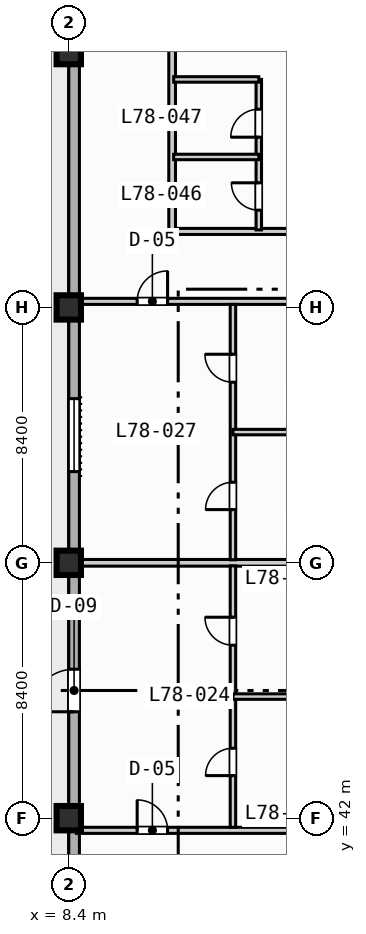
"""IFC4 building model, lengths in metres.
Left out: names, types, materials, properties, quantities, classifications, styles, units other than length and angle.
Written with IfcOpenShell. Run it as: python <this file> out.ifc"""

import sys

from ifc_helpers import new_model, si_unit, direction, frame, frame_2d, origin, origin_2d, place, context, subcontext, project, spatial, rectangle, extrude, element, fill, save


model = new_model("IFC4")
c1 = context("Model", 3, precision=1e-05, world=origin(), true_north=direction((0.0, 1.0)))
c2 = subcontext(c1, "Body", "Model", "MODEL_VIEW")
j1 = project(units=[si_unit("LENGTHUNIT", "METRE"), si_unit("PLANEANGLEUNIT", "RADIAN")], contexts=[c1])
p1 = place(None, origin())
s1 = spatial("IfcSite", under=j1, at=p1, CompositionType="ELEMENT")
p2 = place(p1, origin())
s2 = spatial("IfcBuilding", under=s1, at=p2, CompositionType="ELEMENT")
p3 = place(p2, frame((0.0, 0.0, 316.4)))
s3 = spatial("IfcBuildingStorey", under=s2, at=p3, CompositionType="ELEMENT", Elevation=316.4)
for number, where, z_axis, x_axis in (
    (1, (8.4, 42.0, 0.0), (0.0, 0.0, 1.0), (1.0, 0.0, 0.0)),
    (2, (8.4, 50.4, 0.0), (0.0, 0.0, 1.0), (1.0, 0.0, 0.0)),
    (3, (8.4, 58.8, 0.0), (0.0, 0.0, 1.0), (1.0, 0.0, 0.0)),
    (4, (8.4, 67.2, 0.0), (0.0, 0.0, 1.0), (1.0, 0.0, 0.0)),
):
    element("IfcColumn", number, at=place(p3, frame(where, z_axis=z_axis, x_axis=x_axis)), inside=s3, PredefinedType="COLUMN", context=c2, shape_type="SweptSolid", body=[
        extrude(rectangle(XDim=0.8, YDim=0.8, at=origin_2d()), origin(), (0.0, 0.0, 1.0), 3.9),
    ])
p4 = place(p3, frame((8.575, 11.575, 0.0), z_axis=(0.0, 0.0, 1.0), x_axis=(0.0, 1.0, 0.0)))
e5 = element("IfcWall", 5, at=p4, inside=s3, PredefinedType="STANDARD", context=c2, shape_type="SweptSolid", body=[
    extrude(rectangle(XDim=60.85, YDim=0.35, at=frame_2d((30.425, 0.0))), origin(), (0.0, 0.0, 1.0), 3.67),
])
p5 = place(p4, frame((33.925, 0.0, 0.0)))
e6 = element("IfcOpeningElement", 6, at=p5, cuts=e5, PredefinedType="OPENING", context=c2, shape_type="SweptSolid", body=[
    extrude(rectangle(XDim=1.4, YDim=2.2, at=frame_2d((0.7, 1.1))), frame((0.0, 0.185, 0.0), z_axis=(0.0, -1.0, 0.0), x_axis=(1.0, 0.0, 0.0)), (0.0, 0.0, 1.0), 0.37),
])
p6 = place(p4, frame((25.025, 0.0, 0.85)))
e7 = element("IfcOpeningElement", 7, at=p6, cuts=e5, PredefinedType="OPENING", context=c2, shape_type="SweptSolid", body=[
    extrude(rectangle(XDim=2.4, YDim=1.95, at=frame_2d((1.2, 0.975))), frame((0.0, 0.185, 0.0), z_axis=(0.0, -1.0, 0.0), x_axis=(1.0, 0.0, 0.0)), (0.0, 0.0, 1.0), 0.37),
])
p7 = place(p4, frame((41.825, 0.0, 0.85)))
e8 = element("IfcOpeningElement", 8, at=p7, cuts=e5, PredefinedType="OPENING", context=c2, shape_type="SweptSolid", body=[
    extrude(rectangle(XDim=2.4, YDim=1.95, at=frame_2d((1.2, 0.975))), frame((0.0, 0.185, 0.0), z_axis=(0.0, -1.0, 0.0), x_axis=(1.0, 0.0, 0.0)), (0.0, 0.0, 1.0), 0.37),
])
p8 = place(p4, frame((19.25, 0.0, 0.85)))
e9 = element("IfcOpeningElement", 9, at=p8, cuts=e5, PredefinedType="OPENING", context=c2, shape_type="SweptSolid", body=[
    extrude(rectangle(XDim=1.8, YDim=1.8, at=frame_2d((0.9, 0.9))), frame((0.0, 0.185, 0.0), z_axis=(0.0, -1.0, 0.0), x_axis=(1.0, 0.0, 0.0)), (0.0, 0.0, 1.0), 0.37),
])
p9 = place(p3, frame((8.65, 41.6, 0.0), z_axis=(0.0, 0.0, 1.0), x_axis=(1.0, 0.0, 0.0)))
e10 = element("IfcWall", 10, at=p9, inside=s3, PredefinedType="PARTITIONING", context=c2, shape_type="SweptSolid", body=[
    extrude(rectangle(XDim=7.95, YDim=0.2, at=frame_2d((3.975, 0.0))), origin(), (0.0, 0.0, 1.0), 3.67),
])
p10 = place(p9, frame((2.0, 0.0, 0.0)))
e11 = element("IfcOpeningElement", 11, at=p10, cuts=e10, PredefinedType="OPENING", context=c2, shape_type="SweptSolid", body=[
    extrude(rectangle(XDim=1.0, YDim=2.15, at=frame_2d((0.5, 1.075))), frame((0.0, 0.11, 0.0), z_axis=(0.0, -1.0, 0.0), x_axis=(1.0, 0.0, 0.0)), (0.0, 0.0, 1.0), 0.22),
])
p11 = place(p3, frame((8.65, 59.0, 0.0), z_axis=(0.0, 0.0, 1.0), x_axis=(1.0, 0.0, 0.0)))
e12 = element("IfcWall", 12, at=p11, inside=s3, PredefinedType="PARTITIONING", context=c2, shape_type="SweptSolid", body=[
    extrude(rectangle(XDim=7.95, YDim=0.2, at=frame_2d((3.975, 0.0))), origin(), (0.0, 0.0, 1.0), 3.07),
])
p12 = place(p11, frame((2.0, 0.0, 0.0)))
e13 = element("IfcOpeningElement", 13, at=p12, cuts=e12, PredefinedType="OPENING", context=c2, shape_type="SweptSolid", body=[
    extrude(rectangle(XDim=1.0, YDim=2.15, at=frame_2d((0.5, 1.075))), frame((0.0, 0.11, 0.0), z_axis=(0.0, -1.0, 0.0), x_axis=(1.0, 0.0, 0.0)), (0.0, 0.0, 1.0), 0.22),
])
p13 = place(p3, frame((8.65, 50.4, 0.0), z_axis=(0.0, 0.0, 1.0), x_axis=(1.0, 0.0, 0.0)))
e14 = element("IfcWall", 14, at=p13, inside=s3, PredefinedType="PARTITIONING", context=c2, shape_type="SweptSolid", body=[
    extrude(rectangle(XDim=7.95, YDim=0.22, at=frame_2d((3.975, 0.0))), origin(), (0.0, 0.0, 1.0), 3.207),
])
p14 = place(p3, frame((13.8, 41.7, 0.0), z_axis=(0.0, 0.0, 1.0), x_axis=(0.0, 1.0, 0.0)))
e15 = element("IfcWall", 15, at=p14, inside=s3, PredefinedType="PLUMBINGWALL", context=c2, shape_type="SweptSolid", body=[
    extrude(rectangle(XDim=8.6, YDim=0.18, at=frame_2d((4.3, 0.0))), origin(), (0.0, 0.0, 1.0), 3.67),
])
p15 = place(p14, frame((1.7, 0.0, 0.0)))
e16 = element("IfcOpeningElement", 16, at=p15, cuts=e15, PredefinedType="OPENING", context=c2, shape_type="SweptSolid", body=[
    extrude(rectangle(XDim=0.9, YDim=2.1, at=frame_2d((0.45, 1.05))), frame((0.0, 0.1, 0.0), z_axis=(0.0, -1.0, 0.0), x_axis=(1.0, 0.0, 0.0)), (0.0, 0.0, 1.0), 0.2),
])
p16 = place(p14, frame((5.99, 0.0, 0.0)))
e17 = element("IfcOpeningElement", 17, at=p16, cuts=e15, PredefinedType="OPENING", context=c2, shape_type="SweptSolid", body=[
    extrude(rectangle(XDim=0.92, YDim=2.1, at=frame_2d((0.46, 1.05))), frame((0.0, 0.1, 0.0), z_axis=(0.0, -1.0, 0.0), x_axis=(1.0, 0.0, 0.0)), (0.0, 0.0, 1.0), 0.2),
])
p17 = place(p3, frame((13.8, 46.0, 0.0), z_axis=(0.0, 0.0, 1.0), x_axis=(1.0, 0.0, 0.0)))
e18 = element("IfcWall", 18, at=p17, inside=s3, PredefinedType="PLUMBINGWALL", context=c2, shape_type="SweptSolid", body=[
    extrude(rectangle(XDim=2.8, YDim=0.18, at=frame_2d((1.4, 0.0))), origin(), (0.0, 0.0, 1.0), 3.67),
])
p18 = place(p3, frame((13.8, 50.5, 0.0), z_axis=(0.0, 0.0, 1.0), x_axis=(0.0, 1.0, 0.0)))
e19 = element("IfcWall", 19, at=p18, inside=s3, PredefinedType="PLUMBINGWALL", context=c2, shape_type="SweptSolid", body=[
    extrude(rectangle(XDim=8.4, YDim=0.18, at=frame_2d((4.2, 0.0))), origin(), (0.0, 0.0, 1.0), 3.67),
])
p19 = place(p18, frame((1.65, 0.0, 0.0)))
e20 = element("IfcOpeningElement", 20, at=p19, cuts=e19, PredefinedType="OPENING", context=c2, shape_type="SweptSolid", body=[
    extrude(rectangle(XDim=0.9, YDim=2.1, at=frame_2d((0.45, 1.05))), frame((0.0, 0.1, 0.0), z_axis=(0.0, -1.0, 0.0), x_axis=(1.0, 0.0, 0.0)), (0.0, 0.0, 1.0), 0.2),
])
p20 = place(p18, frame((5.84, 0.0, 0.0)))
e21 = element("IfcOpeningElement", 21, at=p20, cuts=e19, PredefinedType="OPENING", context=c2, shape_type="SweptSolid", body=[
    extrude(rectangle(XDim=0.92, YDim=2.1, at=frame_2d((0.46, 1.05))), frame((0.0, 0.1, 0.0), z_axis=(0.0, -1.0, 0.0), x_axis=(1.0, 0.0, 0.0)), (0.0, 0.0, 1.0), 0.2),
])
p21 = place(p3, frame((13.8, 54.7, 0.0), z_axis=(0.0, 0.0, 1.0), x_axis=(1.0, 0.0, 0.0)))
e22 = element("IfcWall", 22, at=p21, inside=s3, PredefinedType="PLUMBINGWALL", context=c2, shape_type="SweptSolid", body=[
    extrude(rectangle(XDim=2.8, YDim=0.18, at=frame_2d((1.4, 0.0))), origin(), (0.0, 0.0, 1.0), 3.67),
])
p22 = place(p3, frame((11.8, 61.3, 0.0), z_axis=(0.0, 0.0, 1.0), x_axis=(1.0, 0.0, 0.0)))
e23 = element("IfcWall", 23, at=p22, inside=s3, PredefinedType="PARTITIONING", context=c2, shape_type="SweptSolid", body=[
    extrude(rectangle(XDim=21.35, YDim=0.2, at=frame_2d((10.675, 0.0))), origin(), (0.0, 0.0, 1.0), 3.67),
])
p23 = place(p22, frame((4.05, 0.0, 0.0)))
e24 = element("IfcOpeningElement", 24, at=p23, cuts=e23, PredefinedType="OPENING", context=c2, shape_type="SweptSolid", body=[
    extrude(rectangle(XDim=1.0, YDim=2.15, at=frame_2d((0.5, 1.075))), frame((0.0, 0.11, 0.0), z_axis=(0.0, -1.0, 0.0), x_axis=(1.0, 0.0, 0.0)), (0.0, 0.0, 1.0), 0.22),
])
p24 = place(p3, frame((11.8, 61.3, 0.0), z_axis=(0.0, 0.0, 1.0), x_axis=(0.0, 1.0, 0.0)))
e25 = element("IfcWall", 25, at=p24, inside=s3, PredefinedType="PARTITIONING", context=c2, shape_type="SweptSolid", body=[
    extrude(rectangle(XDim=11.1, YDim=0.22, at=frame_2d((5.55, 0.0))), origin(), (0.0, 0.0, 1.0), 3.67),
])
p25 = place(p3, frame((14.65, 61.35, 0.0), z_axis=(0.0, 0.0, 1.0), x_axis=(0.0, 1.0, 0.0)))
e26 = element("IfcWall", 26, at=p25, inside=s3, PredefinedType="PLUMBINGWALL", context=c2, shape_type="SweptSolid", body=[
    extrude(rectangle(XDim=4.95, YDim=0.18, at=frame_2d((2.475, 0.0))), origin(), (0.0, 0.0, 1.0), 3.67),
])
p26 = place(p25, frame((0.65, 0.0, 0.0)))
e27 = element("IfcOpeningElement", 27, at=p26, cuts=e26, PredefinedType="OPENING", context=c2, shape_type="SweptSolid", body=[
    extrude(rectangle(XDim=0.9, YDim=2.1, at=frame_2d((0.45, 1.05))), frame((0.0, 0.1, 0.0), z_axis=(0.0, -1.0, 0.0), x_axis=(1.0, 0.0, 0.0)), (0.0, 0.0, 1.0), 0.2),
])
p27 = place(p25, frame((3.05, 0.0, 0.0)))
e28 = element("IfcOpeningElement", 28, at=p27, cuts=e26, PredefinedType="OPENING", context=c2, shape_type="SweptSolid", body=[
    extrude(rectangle(XDim=0.92, YDim=2.1, at=frame_2d((0.46, 1.05))), frame((0.0, 0.1, 0.0), z_axis=(0.0, -1.0, 0.0), x_axis=(1.0, 0.0, 0.0)), (0.0, 0.0, 1.0), 0.2),
])
for number, where, z_axis, x_axis in (
    (29, (11.85, 63.75, 0.0), (0.0, 0.0, 1.0), (1.0, 0.0, 0.0)),
    (30, (11.85, 66.3, 0.0), (0.0, 0.0, 1.0), (1.0, 0.0, 0.0)),
):
    element("IfcWall", number, at=place(p3, frame(where, z_axis=z_axis, x_axis=x_axis)), inside=s3, PredefinedType="PLUMBINGWALL", context=c2, shape_type="SweptSolid", body=[
        extrude(rectangle(XDim=2.8, YDim=0.18, at=frame_2d((1.4, 0.0))), origin(), (0.0, 0.0, 1.0), 3.67),
    ])
p28 = place(p5, origin())
e31 = element("IfcDoor", 31, at=p28, inside=s3, OperationType="SINGLE_SWING_LEFT", PredefinedType="DOOR", context=c2, shape_type="SweptSolid", body=[
    extrude(rectangle(XDim=1.4, YDim=2.2, at=frame_2d((0.7, 1.1))), frame((0.0, 0.025, 0.0), z_axis=(0.0, -1.0, 0.0), x_axis=(1.0, 0.0, 0.0)), (0.0, 0.0, 1.0), 0.05),
])
fill(e6, e31)
p29 = place(p7, origin())
e32 = element("IfcWindow", 32, at=p29, inside=s3, PartitioningType="SINGLE_PANEL", PredefinedType="WINDOW", context=c2, shape_type="SweptSolid", body=[
    extrude(rectangle(XDim=2.4, YDim=1.95, at=frame_2d((1.2, 0.975))), frame((0.0, 0.03, 0.0), z_axis=(0.0, -1.0, 0.0), x_axis=(1.0, 0.0, 0.0)), (0.0, 0.0, 1.0), 0.06),
])
fill(e8, e32)
p30 = place(p10, origin())
e33 = element("IfcDoor", 33, at=p30, inside=s3, OperationType="SINGLE_SWING_LEFT", PredefinedType="DOOR", context=c2, shape_type="SweptSolid", body=[
    extrude(rectangle(XDim=1.0, YDim=2.15, at=frame_2d((0.5, 1.075))), frame((0.0, 0.025, 0.0), z_axis=(0.0, -1.0, 0.0), x_axis=(1.0, 0.0, 0.0)), (0.0, 0.0, 1.0), 0.05),
])
fill(e11, e33)
p31 = place(p12, origin())
e34 = element("IfcDoor", 34, at=p31, inside=s3, OperationType="SINGLE_SWING_RIGHT", PredefinedType="DOOR", context=c2, shape_type="SweptSolid", body=[
    extrude(rectangle(XDim=1.0, YDim=2.15, at=frame_2d((0.5, 1.075))), frame((0.0, 0.025, 0.0), z_axis=(0.0, -1.0, 0.0), x_axis=(1.0, 0.0, 0.0)), (0.0, 0.0, 1.0), 0.05),
])
fill(e13, e34)
p32 = place(p15, origin())
e35 = element("IfcDoor", 35, at=p32, inside=s3, OperationType="SINGLE_SWING_LEFT", PredefinedType="DOOR", context=c2, shape_type="SweptSolid", body=[
    extrude(rectangle(XDim=0.9, YDim=2.1, at=frame_2d((0.45, 1.05))), frame((0.0, 0.025, 0.0), z_axis=(0.0, -1.0, 0.0), x_axis=(1.0, 0.0, 0.0)), (0.0, 0.0, 1.0), 0.05),
])
fill(e16, e35)
p33 = place(p16, origin())
e36 = element("IfcDoor", 36, at=p33, inside=s3, OperationType="SINGLE_SWING_RIGHT", PredefinedType="DOOR", context=c2, shape_type="SweptSolid", body=[
    extrude(rectangle(XDim=0.92, YDim=2.1, at=frame_2d((0.46, 1.05))), frame((0.0, 0.025, 0.0), z_axis=(0.0, -1.0, 0.0), x_axis=(1.0, 0.0, 0.0)), (0.0, 0.0, 1.0), 0.05),
])
fill(e17, e36)
p34 = place(p19, origin())
e37 = element("IfcDoor", 37, at=p34, inside=s3, OperationType="SINGLE_SWING_LEFT", PredefinedType="DOOR", context=c2, shape_type="SweptSolid", body=[
    extrude(rectangle(XDim=0.9, YDim=2.1, at=frame_2d((0.45, 1.05))), frame((0.0, 0.025, 0.0), z_axis=(0.0, -1.0, 0.0), x_axis=(1.0, 0.0, 0.0)), (0.0, 0.0, 1.0), 0.05),
])
fill(e20, e37)
p35 = place(p20, origin())
e38 = element("IfcDoor", 38, at=p35, inside=s3, OperationType="SINGLE_SWING_RIGHT", PredefinedType="DOOR", context=c2, shape_type="SweptSolid", body=[
    extrude(rectangle(XDim=0.92, YDim=2.1, at=frame_2d((0.46, 1.05))), frame((0.0, 0.025, 0.0), z_axis=(0.0, -1.0, 0.0), x_axis=(1.0, 0.0, 0.0)), (0.0, 0.0, 1.0), 0.05),
])
fill(e21, e38)
p36 = place(p26, origin())
e39 = element("IfcDoor", 39, at=p36, inside=s3, OperationType="SINGLE_SWING_RIGHT", PredefinedType="DOOR", context=c2, shape_type="SweptSolid", body=[
    extrude(rectangle(XDim=0.9, YDim=2.1, at=frame_2d((0.45, 1.05))), frame((0.0, 0.025, 0.0), z_axis=(0.0, -1.0, 0.0), x_axis=(1.0, 0.0, 0.0)), (0.0, 0.0, 1.0), 0.05),
])
fill(e27, e39)
p37 = place(p27, origin())
e40 = element("IfcDoor", 40, at=p37, inside=s3, OperationType="SINGLE_SWING_LEFT", PredefinedType="DOOR", context=c2, shape_type="SweptSolid", body=[
    extrude(rectangle(XDim=0.92, YDim=2.1, at=frame_2d((0.46, 1.05))), frame((0.0, 0.025, 0.0), z_axis=(0.0, -1.0, 0.0), x_axis=(1.0, 0.0, 0.0)), (0.0, 0.0, 1.0), 0.05),
])
fill(e28, e40)
save(model, sys.argv[1])
